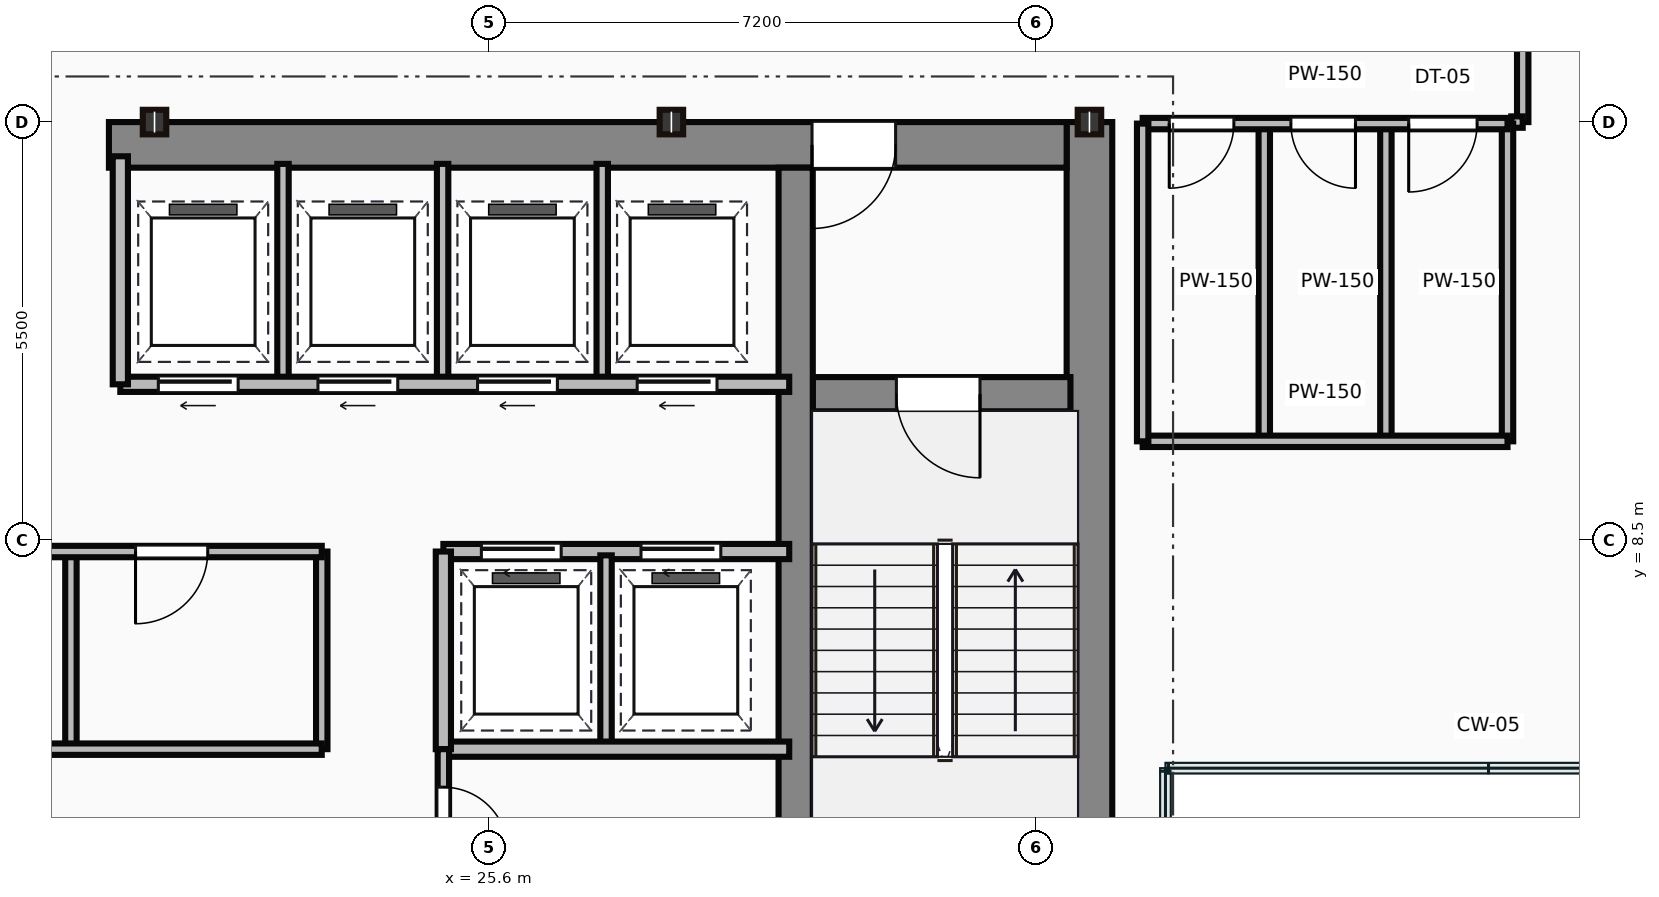
"""IFC4 building model, lengths in metres.
Left out: names, types, materials, properties, quantities, classifications, styles, units other than length and angle.
Written with IfcOpenShell. Run it as: python <this file> out.ifc"""

import sys

from ifc_helpers import new_model, si_unit, direction, frame, frame_2d, origin, origin_2d, place, context, subcontext, project, spatial, rectangle, i_section, extrude, source, transform, mapped, element, fill, save


model = new_model("IFC4")
c1 = context("Model", 3, precision=1e-05, world=origin(), true_north=direction((0.0, 1.0)))
c2 = subcontext(c1, "Body", "Model", "MODEL_VIEW")
j1 = project(units=[si_unit("LENGTHUNIT", "METRE"), si_unit("PLANEANGLEUNIT", "RADIAN")], contexts=[c1])
p1 = place(None, origin())
s1 = spatial("IfcSite", under=j1, at=p1, CompositionType="ELEMENT")
p2 = place(p1, origin())
s2 = spatial("IfcBuilding", under=s1, at=p2, CompositionType="ELEMENT")
p3 = place(p2, frame((0.0, 0.0, 258.8)))
s3 = spatial("IfcBuildingStorey", under=s2, at=p3, CompositionType="ELEMENT", Elevation=258.8)
m1 = source(origin(), c2, "Body", "SweptSolid", [
    extrude(rectangle(XDim=13.1, YDim=0.6, at=frame_2d((6.55, 0.0))), origin(), (0.0, 0.0, 1.0), 3.65),
])
p4 = place(p3, frame((33.5, 0.9, 0.0), z_axis=(0.0, 0.0, 1.0), x_axis=(0.0, 1.0, 0.0)))
e1 = element("IfcWall", 1, at=p4, inside=s3, PredefinedType="SHEAR", context=c2, shape_type="MappedRepresentation", body=[
    mapped(m1, transform((0.0, 0.0, 0.0))),
])
m2 = source(origin(), c2, "Body", "SweptSolid", [
    extrude(rectangle(XDim=12.6, YDim=0.6, at=frame_2d((6.3, 0.0))), origin(), (0.0, 0.0, 1.0), 3.65),
])
p5 = place(p3, frame((20.6, 13.7, 0.0), z_axis=(0.0, 0.0, 1.0), x_axis=(1.0, 0.0, 0.0)))
e2 = element("IfcWall", 2, at=p5, inside=s3, PredefinedType="SHEAR", context=c2, shape_type="MappedRepresentation", body=[
    mapped(m2, transform((0.0, 0.0, 0.0))),
])
p6 = place(p5, frame((9.25, 0.0, 0.0)))
e3 = element("IfcOpeningElement", 3, at=p6, cuts=e2, PredefinedType="OPENING", context=c2, shape_type="SweptSolid", body=[
    extrude(rectangle(XDim=1.1, YDim=2.15, at=frame_2d((0.55, 1.075))), frame((0.0, 0.31, 0.0), z_axis=(0.0, -1.0, 0.0), x_axis=(1.0, 0.0, 0.0)), (0.0, 0.0, 1.0), 0.62),
])
m3 = source(origin(), c2, "Body", "SweptSolid", [
    extrude(rectangle(XDim=12.5, YDim=0.45, at=frame_2d((6.25, 0.0))), origin(), (0.0, 0.0, 1.0), 3.65),
])
p7 = place(p3, frame((29.635, 0.9, 0.0), z_axis=(0.0, 0.0, 1.0), x_axis=(0.0, 1.0, 0.0)))
e4 = element("IfcWall", 4, at=p7, inside=s3, PredefinedType="SHEAR", context=c2, shape_type="MappedRepresentation", body=[
    mapped(m3, transform((0.0, 0.0, 0.0))),
])
m4 = source(origin(), c2, "Body", "SweptSolid", [
    extrude(rectangle(XDim=3.39, YDim=0.45, at=frame_2d((1.695, 0.0))), origin(), (0.0, 0.0, 1.0), 3.65),
])
p8 = place(p3, frame((29.86, 10.42, 0.0), z_axis=(0.0, 0.0, 1.0), x_axis=(1.0, 0.0, 0.0)))
e5 = element("IfcWall", 5, at=p8, inside=s3, PredefinedType="SHEAR", context=c2, shape_type="MappedRepresentation", body=[
    mapped(m4, transform((0.0, 0.0, 0.0))),
])
p9 = place(p8, frame((1.1, 0.0, 0.0)))
e6 = element("IfcOpeningElement", 6, at=p9, cuts=e5, PredefinedType="OPENING", context=c2, shape_type="SweptSolid", body=[
    extrude(rectangle(XDim=1.1, YDim=2.15, at=frame_2d((0.55, 1.075))), frame((0.0, 0.235, 0.0), z_axis=(0.0, -1.0, 0.0), x_axis=(1.0, 0.0, 0.0)), (0.0, 0.0, 1.0), 0.47),
])
m5 = source(origin(), c2, "Body", "SweptSolid", [
    extrude(i_section(OverallWidth=0.309, OverallDepth=0.323, WebThickness=0.014, FlangeThickness=0.023, at=origin_2d()), origin(), (0.0, 0.0, 1.0), 3.65),
])
for number, where, z_axis, x_axis in (
    (7, (21.2, 14.0, 0.0), (0.0, 0.0, 1.0), (1.0, 0.0, 0.0)),
    (8, (28.0, 14.0, 0.0), (0.0, 0.0, 1.0), (1.0, 0.0, 0.0)),
    (9, (33.5, 14.0, 0.0), (0.0, 0.0, 1.0), (1.0, 0.0, 0.0)),
):
    element("IfcColumn", number, at=place(p3, frame(where, z_axis=z_axis, x_axis=x_axis)), inside=s3, PredefinedType="COLUMN", context=c2, shape_type="MappedRepresentation", body=[
        mapped(m5, transform((0.0, 0.0, 0.0))),
    ])
m6 = source(origin(), c2, "Body", "SweptSolid", [
    extrude(rectangle(XDim=11.85, YDim=0.15, at=frame_2d((5.925, 0.0))), origin(), (0.0, 0.0, 1.0), 3.4),
])
p10 = place(p3, frame((11.55, 5.75, 0.0), z_axis=(0.0, 0.0, 1.0), x_axis=(1.0, 0.0, 0.0)))
e10 = element("IfcWall", 10, at=p10, inside=s3, PredefinedType="PARTITIONING", context=c2, shape_type="MappedRepresentation", body=[
    mapped(m6, transform((0.0, 0.0, 0.0))),
])
p11 = place(p3, frame((11.55, 8.35, 0.0), z_axis=(0.0, 0.0, 1.0), x_axis=(1.0, 0.0, 0.0)))
e11 = element("IfcWall", 11, at=p11, inside=s3, PredefinedType="PARTITIONING", context=c2, shape_type="MappedRepresentation", body=[
    mapped(m6, transform((0.0, 0.0, 0.0))),
])
p12 = place(p11, frame((1.1, 0.0, 0.0)))
e12 = element("IfcOpeningElement", 12, at=p12, cuts=e11, PredefinedType="OPENING", context=c2, shape_type="SweptSolid", body=[
    extrude(rectangle(XDim=0.95, YDim=2.15, at=frame_2d((0.475, 1.075))), frame((0.0, 0.085, 0.0), z_axis=(0.0, -1.0, 0.0), x_axis=(1.0, 0.0, 0.0)), (0.0, 0.0, 1.0), 0.17),
])
p13 = place(p11, frame((9.4, 0.0, 0.0)))
e13 = element("IfcOpeningElement", 13, at=p13, cuts=e11, PredefinedType="OPENING", context=c2, shape_type="SweptSolid", body=[
    extrude(rectangle(XDim=0.95, YDim=2.15, at=frame_2d((0.475, 1.075))), frame((0.0, 0.085, 0.0), z_axis=(0.0, -1.0, 0.0), x_axis=(1.0, 0.0, 0.0)), (0.0, 0.0, 1.0), 0.17),
])
m7 = source(origin(), c2, "Body", "SweptSolid", [
    extrude(rectangle(XDim=2.6, YDim=0.15, at=frame_2d((1.3, 0.0))), origin(), (0.0, 0.0, 1.0), 3.4),
])
p14 = place(p3, frame((23.4, 5.75, 0.0), z_axis=(0.0, 0.0, 1.0), x_axis=(0.0, 1.0, 0.0)))
e14 = element("IfcWall", 14, at=p14, inside=s3, PredefinedType="PARTITIONING", context=c2, shape_type="MappedRepresentation", body=[
    mapped(m7, transform((0.0, 0.0, 0.0))),
])
m8 = source(origin(), c2, "Body", "SweptSolid", [
    extrude(rectangle(XDim=2.5, YDim=0.15, at=frame_2d((1.25, 0.0))), origin(), (0.0, 0.0, 1.0), 3.4),
])
p15 = place(p3, frame((20.1, 5.8, 0.0), z_axis=(0.0, 0.0, 1.0), x_axis=(0.0, 1.0, 0.0)))
e15 = element("IfcWall", 15, at=p15, inside=s3, PredefinedType="PARTITIONING", context=c2, shape_type="MappedRepresentation", body=[
    mapped(m8, transform((0.0, 0.0, 0.0))),
])
m9 = source(origin(), c2, "Body", "SweptSolid", [
    extrude(rectangle(XDim=8.8, YDim=0.2, at=frame_2d((4.4, 0.0))), origin(), (0.0, 0.0, 1.0), 3.4),
])
p16 = place(p3, frame((20.75, 10.55, 0.0), z_axis=(0.0, 0.0, 1.0), x_axis=(1.0, 0.0, 0.0)))
e16 = element("IfcWall", 16, at=p16, inside=s3, PredefinedType="PARTITIONING", context=c2, shape_type="MappedRepresentation", body=[
    mapped(m9, transform((0.0, 0.0, 0.0))),
])
p17 = place(p16, frame((0.5, 0.0, 0.0)))
e17 = element("IfcOpeningElement", 17, at=p17, cuts=e16, PredefinedType="OPENING", context=c2, shape_type="SweptSolid", body=[
    extrude(rectangle(XDim=1.05, YDim=2.15, at=frame_2d((0.525, 1.075))), frame((0.0, 0.11, 0.0), z_axis=(0.0, -1.0, 0.0), x_axis=(1.0, 0.0, 0.0)), (0.0, 0.0, 1.0), 0.22),
])
p18 = place(p16, frame((2.6, 0.0, 0.0)))
e18 = element("IfcOpeningElement", 18, at=p18, cuts=e16, PredefinedType="OPENING", context=c2, shape_type="SweptSolid", body=[
    extrude(rectangle(XDim=1.05, YDim=2.15, at=frame_2d((0.525, 1.075))), frame((0.0, 0.11, 0.0), z_axis=(0.0, -1.0, 0.0), x_axis=(1.0, 0.0, 0.0)), (0.0, 0.0, 1.0), 0.22),
])
p19 = place(p16, frame((4.7, 0.0, 0.0)))
e19 = element("IfcOpeningElement", 19, at=p19, cuts=e16, PredefinedType="OPENING", context=c2, shape_type="SweptSolid", body=[
    extrude(rectangle(XDim=1.05, YDim=2.15, at=frame_2d((0.525, 1.075))), frame((0.0, 0.11, 0.0), z_axis=(0.0, -1.0, 0.0), x_axis=(1.0, 0.0, 0.0)), (0.0, 0.0, 1.0), 0.22),
])
p20 = place(p16, frame((6.8, 0.0, 0.0)))
e20 = element("IfcOpeningElement", 20, at=p20, cuts=e16, PredefinedType="OPENING", context=c2, shape_type="SweptSolid", body=[
    extrude(rectangle(XDim=1.05, YDim=2.15, at=frame_2d((0.525, 1.075))), frame((0.0, 0.11, 0.0), z_axis=(0.0, -1.0, 0.0), x_axis=(1.0, 0.0, 0.0)), (0.0, 0.0, 1.0), 0.22),
])
m10 = source(origin(), c2, "Body", "SweptSolid", [
    extrude(rectangle(XDim=3.0, YDim=0.2, at=frame_2d((1.5, 0.0))), origin(), (0.0, 0.0, 1.0), 3.4),
])
p21 = place(p3, frame((20.75, 10.55, 0.0), z_axis=(0.0, 0.0, 1.0), x_axis=(0.0, 1.0, 0.0)))
e21 = element("IfcWall", 21, at=p21, inside=s3, PredefinedType="PARTITIONING", context=c2, shape_type="MappedRepresentation", body=[
    mapped(m10, transform((0.0, 0.0, 0.0))),
])
m11 = source(origin(), c2, "Body", "SweptSolid", [
    extrude(rectangle(XDim=2.85, YDim=0.15, at=frame_2d((1.425, 0.0))), origin(), (0.0, 0.0, 1.0), 3.4),
])
for number, where, z_axis, x_axis in (
    (22, (22.89, 10.6, 0.0), (0.0, 0.0, 1.0), (0.0, 1.0, 0.0)),
    (23, (24.99, 10.6, 0.0), (0.0, 0.0, 1.0), (0.0, 1.0, 0.0)),
    (24, (27.09, 10.6, 0.0), (0.0, 0.0, 1.0), (0.0, 1.0, 0.0)),
):
    element("IfcWall", number, at=place(p3, frame(where, z_axis=z_axis, x_axis=x_axis)), inside=s3, PredefinedType="PARTITIONING", context=c2, shape_type="MappedRepresentation", body=[
        mapped(m11, transform((0.0, 0.0, 0.0))),
    ])
m12 = source(origin(), c2, "Body", "SweptSolid", [
    extrude(rectangle(XDim=4.55, YDim=0.2, at=frame_2d((2.275, 0.0))), origin(), (0.0, 0.0, 1.0), 3.4),
])
p22 = place(p3, frame((25.0, 8.35, 0.0), z_axis=(0.0, 0.0, 1.0), x_axis=(1.0, 0.0, 0.0)))
e25 = element("IfcWall", 25, at=p22, inside=s3, PredefinedType="PARTITIONING", context=c2, shape_type="MappedRepresentation", body=[
    mapped(m12, transform((0.0, 0.0, 0.0))),
])
p23 = place(p22, frame((0.5, 0.0, 0.0)))
e26 = element("IfcOpeningElement", 26, at=p23, cuts=e25, PredefinedType="OPENING", context=c2, shape_type="SweptSolid", body=[
    extrude(rectangle(XDim=1.05, YDim=2.15, at=frame_2d((0.525, 1.075))), frame((0.0, 0.11, 0.0), z_axis=(0.0, -1.0, 0.0), x_axis=(1.0, 0.0, 0.0)), (0.0, 0.0, 1.0), 0.22),
])
p24 = place(p22, frame((2.6, 0.0, 0.0)))
e27 = element("IfcOpeningElement", 27, at=p24, cuts=e25, PredefinedType="OPENING", context=c2, shape_type="SweptSolid", body=[
    extrude(rectangle(XDim=1.05, YDim=2.15, at=frame_2d((0.525, 1.075))), frame((0.0, 0.11, 0.0), z_axis=(0.0, -1.0, 0.0), x_axis=(1.0, 0.0, 0.0)), (0.0, 0.0, 1.0), 0.22),
])
p25 = place(p3, frame((25.0, 5.75, 0.0), z_axis=(0.0, 0.0, 1.0), x_axis=(1.0, 0.0, 0.0)))
e28 = element("IfcWall", 28, at=p25, inside=s3, PredefinedType="PARTITIONING", context=c2, shape_type="MappedRepresentation", body=[
    mapped(m12, transform((0.0, 0.0, 0.0))),
])
m13 = source(origin(), c2, "Body", "SweptSolid", [
    extrude(rectangle(XDim=2.6, YDim=0.2, at=frame_2d((1.3, 0.0))), origin(), (0.0, 0.0, 1.0), 3.4),
])
p26 = place(p3, frame((25.0, 5.75, 0.0), z_axis=(0.0, 0.0, 1.0), x_axis=(0.0, 1.0, 0.0)))
e29 = element("IfcWall", 29, at=p26, inside=s3, PredefinedType="PARTITIONING", context=c2, shape_type="MappedRepresentation", body=[
    mapped(m13, transform((0.0, 0.0, 0.0))),
])
p27 = place(p3, frame((27.14, 5.8, 0.0), z_axis=(0.0, 0.0, 1.0), x_axis=(0.0, 1.0, 0.0)))
e30 = element("IfcWall", 30, at=p27, inside=s3, PredefinedType="PARTITIONING", context=c2, shape_type="MappedRepresentation", body=[
    mapped(m8, transform((0.0, 0.0, 0.0))),
])
m14 = source(origin(), c2, "Body", "SweptSolid", [
    extrude(rectangle(XDim=4.9, YDim=0.15, at=frame_2d((2.45, 0.0))), origin(), (0.0, 0.0, 1.0), 3.4),
])
p28 = place(p3, frame((25.0, 0.85, 0.0), z_axis=(0.0, 0.0, 1.0), x_axis=(0.0, 1.0, 0.0)))
e31 = element("IfcWall", 31, at=p28, inside=s3, PredefinedType="PARTITIONING", context=c2, shape_type="MappedRepresentation", body=[
    mapped(m14, transform((0.0, 0.0, 0.0))),
])
p29 = place(p28, frame((1.85, 0.0, 0.0)))
e32 = element("IfcOpeningElement", 32, at=p29, cuts=e31, PredefinedType="OPENING", context=c2, shape_type="SweptSolid", body=[
    extrude(rectangle(XDim=0.95, YDim=2.15, at=frame_2d((0.475, 1.075))), frame((0.0, 0.085, 0.0), z_axis=(0.0, -1.0, 0.0), x_axis=(1.0, 0.0, 0.0)), (0.0, 0.0, 1.0), 0.17),
])
p30 = place(p28, frame((3.55, 0.0, 0.0)))
e33 = element("IfcOpeningElement", 33, at=p30, cuts=e31, PredefinedType="OPENING", context=c2, shape_type="SweptSolid", body=[
    extrude(rectangle(XDim=0.85, YDim=2.15, at=frame_2d((0.425, 1.075))), frame((0.0, 0.085, 0.0), z_axis=(0.0, -1.0, 0.0), x_axis=(1.0, 0.0, 0.0)), (0.0, 0.0, 1.0), 0.17),
])
m15 = source(origin(), c2, "Body", "SweptSolid", [
    extrude(rectangle(XDim=4.8, YDim=0.15, at=frame_2d((2.4, 0.0))), origin(), (0.0, 0.0, 1.0), 2.787),
])
p31 = place(p3, frame((34.2, 13.98, 0.0), z_axis=(0.0, 0.0, 1.0), x_axis=(1.0, 0.0, 0.0)))
e34 = element("IfcWall", 34, at=p31, inside=s3, PredefinedType="PARTITIONING", context=c2, shape_type="MappedRepresentation", body=[
    mapped(m15, transform((0.0, 0.0, 0.0))),
])
p32 = place(p31, frame((0.35, 0.0, 0.0)))
e35 = element("IfcOpeningElement", 35, at=p32, cuts=e34, PredefinedType="OPENING", context=c2, shape_type="SweptSolid", body=[
    extrude(rectangle(XDim=0.85, YDim=2.1, at=frame_2d((0.425, 1.05))), frame((0.0, 0.085, 0.0), z_axis=(0.0, -1.0, 0.0), x_axis=(1.0, 0.0, 0.0)), (0.0, 0.0, 1.0), 0.17),
])
p33 = place(p31, frame((1.95, 0.0, 0.0)))
e36 = element("IfcOpeningElement", 36, at=p33, cuts=e34, PredefinedType="OPENING", context=c2, shape_type="SweptSolid", body=[
    extrude(rectangle(XDim=0.85, YDim=2.1, at=frame_2d((0.425, 1.05))), frame((0.0, 0.085, 0.0), z_axis=(0.0, -1.0, 0.0), x_axis=(1.0, 0.0, 0.0)), (0.0, 0.0, 1.0), 0.17),
])
p34 = place(p31, frame((3.5, 0.0, 0.0)))
e37 = element("IfcOpeningElement", 37, at=p34, cuts=e34, PredefinedType="OPENING", context=c2, shape_type="SweptSolid", body=[
    extrude(rectangle(XDim=0.9, YDim=2.1, at=frame_2d((0.45, 1.05))), frame((0.0, 0.085, 0.0), z_axis=(0.0, -1.0, 0.0), x_axis=(1.0, 0.0, 0.0)), (0.0, 0.0, 1.0), 0.17),
])
m16 = source(origin(), c2, "Body", "SweptSolid", [
    extrude(rectangle(XDim=4.8, YDim=0.15, at=frame_2d((2.4, 0.0))), origin(), (0.0, 0.0, 1.0), 3.4),
])
p35 = place(p3, frame((34.2, 9.8, 0.0), z_axis=(0.0, 0.0, 1.0), x_axis=(1.0, 0.0, 0.0)))
e38 = element("IfcWall", 38, at=p35, inside=s3, PredefinedType="PARTITIONING", context=c2, shape_type="MappedRepresentation", body=[
    mapped(m16, transform((0.0, 0.0, 0.0))),
])
m17 = source(origin(), c2, "Body", "SweptSolid", [
    extrude(rectangle(XDim=4.18, YDim=0.15, at=frame_2d((2.09, 0.0))), origin(), (0.0, 0.0, 1.0), 3.4),
])
for number, where, z_axis, x_axis in (
    (39, (39.0, 9.8, 0.0), (0.0, 0.0, 1.0), (0.0, 1.0, 0.0)),
    (40, (34.2, 9.8, 0.0), (0.0, 0.0, 1.0), (0.0, 1.0, 0.0)),
    (41, (35.8, 9.8, 0.0), (0.0, 0.0, 1.0), (0.0, 1.0, 0.0)),
    (42, (37.4, 9.8, 0.0), (0.0, 0.0, 1.0), (0.0, 1.0, 0.0)),
):
    element("IfcWall", number, at=place(p3, frame(where, z_axis=z_axis, x_axis=x_axis)), inside=s3, PredefinedType="PARTITIONING", context=c2, shape_type="MappedRepresentation", body=[
        mapped(m17, transform((0.0, 0.0, 0.0))),
    ])
m18 = source(origin(), c2, "Body", "SweptSolid", [
    extrude(rectangle(XDim=2.2, YDim=0.15, at=frame_2d((1.1, 0.0))), origin(), (0.0, 0.0, 1.0), 3.4),
])
p36 = place(p3, frame((39.2, 16.2, 0.0), z_axis=(0.0, 0.0, 1.0), x_axis=(0.0, -1.0, 0.0)))
e43 = element("IfcWall", 43, at=p36, inside=s3, PredefinedType="PARTITIONING", context=c2, shape_type="MappedRepresentation", body=[
    mapped(m18, transform((0.0, 0.0, 0.0))),
])
m19 = source(origin(), c2, "Body", "SweptSolid", [
    extrude(rectangle(XDim=0.15, YDim=0.15, at=frame_2d((0.075, 0.0))), origin(), (0.0, 0.0, 1.0), 3.4),
])
p37 = place(p3, frame((39.2, 14.0, 0.0), z_axis=(0.0, 0.0, 1.0), x_axis=(-1.0, 0.0, 0.0)))
e44 = element("IfcWall", 44, at=p37, inside=s3, PredefinedType="PARTITIONING", context=c2, shape_type="MappedRepresentation", body=[
    mapped(m19, transform((0.0, 0.0, 0.0))),
])
m20 = source(origin(), c2, "Body", "SweptSolid", [
    extrude(rectangle(XDim=1.1, YDim=2.15, at=frame_2d((0.55, 1.075))), frame((0.0, 0.025, 0.0), z_axis=(0.0, -1.0, 0.0), x_axis=(1.0, 0.0, 0.0)), (0.0, 0.0, 1.0), 0.05),
])
p38 = place(p9, frame((1.1, 0.0, 0.0), z_axis=(0.0, 0.0, 1.0), x_axis=(-1.0, 0.0, 0.0)))
e45 = element("IfcDoor", 45, at=p38, inside=s3, OperationType="SINGLE_SWING_RIGHT", PredefinedType="DOOR", context=c2, shape_type="MappedRepresentation", body=[
    mapped(m20, transform((0.0, 0.0, 0.0))),
])
fill(e6, e45)
p39 = place(p6, origin())
e46 = element("IfcDoor", 46, at=p39, inside=s3, OperationType="SINGLE_SWING_LEFT", PredefinedType="DOOR", context=c2, shape_type="MappedRepresentation", body=[
    mapped(m20, transform((0.0, 0.0, 0.0))),
])
fill(e3, e46)
m21 = source(origin(), c2, "Body", "SweptSolid", [
    extrude(rectangle(XDim=0.95, YDim=2.15, at=frame_2d((0.475, 1.075))), frame((0.0, 0.025, 0.0), z_axis=(0.0, -1.0, 0.0), x_axis=(1.0, 0.0, 0.0)), (0.0, 0.0, 1.0), 0.05),
])
p40 = place(p13, origin())
e47 = element("IfcDoor", 47, at=p40, inside=s3, OperationType="SINGLE_SWING_LEFT", PredefinedType="DOOR", context=c2, shape_type="MappedRepresentation", body=[
    mapped(m21, transform((0.0, 0.0, 0.0))),
])
fill(e13, e47)
m22 = source(origin(), c2, "Body", "SweptSolid", [
    extrude(rectangle(XDim=1.05, YDim=2.15, at=frame_2d((0.525, 1.075))), frame((0.0, 0.025, 0.0), z_axis=(0.0, -1.0, 0.0), x_axis=(1.0, 0.0, 0.0)), (0.0, 0.0, 1.0), 0.05),
])
p41 = place(p17, frame((1.05, 0.0, 0.0), z_axis=(0.0, 0.0, 1.0), x_axis=(-1.0, 0.0, 0.0)))
e48 = element("IfcDoor", 48, at=p41, inside=s3, OperationType="SLIDING_TO_LEFT", PredefinedType="DOOR", context=c2, shape_type="MappedRepresentation", body=[
    mapped(m22, transform((0.0, 0.0, 0.0))),
])
fill(e17, e48)
p42 = place(p18, frame((1.05, 0.0, 0.0), z_axis=(0.0, 0.0, 1.0), x_axis=(-1.0, 0.0, 0.0)))
e49 = element("IfcDoor", 49, at=p42, inside=s3, OperationType="SLIDING_TO_LEFT", PredefinedType="DOOR", context=c2, shape_type="MappedRepresentation", body=[
    mapped(m22, transform((0.0, 0.0, 0.0))),
])
fill(e18, e49)
p43 = place(p19, frame((1.05, 0.0, 0.0), z_axis=(0.0, 0.0, 1.0), x_axis=(-1.0, 0.0, 0.0)))
e50 = element("IfcDoor", 50, at=p43, inside=s3, OperationType="SLIDING_TO_LEFT", PredefinedType="DOOR", context=c2, shape_type="MappedRepresentation", body=[
    mapped(m22, transform((0.0, 0.0, 0.0))),
])
fill(e19, e50)
p44 = place(p20, frame((1.05, 0.0, 0.0), z_axis=(0.0, 0.0, 1.0), x_axis=(-1.0, 0.0, 0.0)))
e51 = element("IfcDoor", 51, at=p44, inside=s3, OperationType="SLIDING_TO_LEFT", PredefinedType="DOOR", context=c2, shape_type="MappedRepresentation", body=[
    mapped(m22, transform((0.0, 0.0, 0.0))),
])
fill(e20, e51)
p45 = place(p23, origin())
e52 = element("IfcDoor", 52, at=p45, inside=s3, OperationType="SLIDING_TO_LEFT", PredefinedType="DOOR", context=c2, shape_type="MappedRepresentation", body=[
    mapped(m22, transform((0.0, 0.0, 0.0))),
])
fill(e26, e52)
p46 = place(p24, origin())
e53 = element("IfcDoor", 53, at=p46, inside=s3, OperationType="SLIDING_TO_LEFT", PredefinedType="DOOR", context=c2, shape_type="MappedRepresentation", body=[
    mapped(m22, transform((0.0, 0.0, 0.0))),
])
fill(e27, e53)
m23 = source(origin(), c2, "Body", "SweptSolid", [
    extrude(rectangle(XDim=0.85, YDim=2.15, at=frame_2d((0.425, 1.075))), frame((0.0, 0.025, 0.0), z_axis=(0.0, -1.0, 0.0), x_axis=(1.0, 0.0, 0.0)), (0.0, 0.0, 1.0), 0.05),
])
p47 = place(p30, origin())
e54 = element("IfcDoor", 54, at=p47, inside=s3, OperationType="SINGLE_SWING_LEFT", PredefinedType="DOOR", context=c2, shape_type="MappedRepresentation", body=[
    mapped(m23, transform((0.0, 0.0, 0.0))),
])
fill(e33, e54)
m24 = source(origin(), c2, "Body", "SweptSolid", [
    extrude(rectangle(XDim=0.85, YDim=2.1, at=frame_2d((0.425, 1.05))), frame((0.0, 0.025, 0.0), z_axis=(0.0, -1.0, 0.0), x_axis=(1.0, 0.0, 0.0)), (0.0, 0.0, 1.0), 0.05),
])
p48 = place(p32, frame((0.85, 0.0, 0.0), z_axis=(0.0, 0.0, 1.0), x_axis=(-1.0, 0.0, 0.0)))
e55 = element("IfcDoor", 55, at=p48, inside=s3, OperationType="SINGLE_SWING_LEFT", PredefinedType="DOOR", context=c2, shape_type="MappedRepresentation", body=[
    mapped(m24, transform((0.0, 0.0, 0.0))),
])
fill(e35, e55)
p49 = place(p33, frame((0.85, 0.0, 0.0), z_axis=(0.0, 0.0, 1.0), x_axis=(-1.0, 0.0, 0.0)))
e56 = element("IfcDoor", 56, at=p49, inside=s3, OperationType="SINGLE_SWING_RIGHT", PredefinedType="DOOR", context=c2, shape_type="MappedRepresentation", body=[
    mapped(m24, transform((0.0, 0.0, 0.0))),
])
fill(e36, e56)
m25 = source(origin(), c2, "Body", "SweptSolid", [
    extrude(rectangle(XDim=0.9, YDim=2.1, at=frame_2d((0.45, 1.05))), frame((0.0, 0.025, 0.0), z_axis=(0.0, -1.0, 0.0), x_axis=(1.0, 0.0, 0.0)), (0.0, 0.0, 1.0), 0.05),
])
p50 = place(p34, frame((0.9, 0.0, 0.0), z_axis=(0.0, 0.0, 1.0), x_axis=(-1.0, 0.0, 0.0)))
e57 = element("IfcDoor", 57, at=p50, inside=s3, OperationType="SINGLE_SWING_LEFT", PredefinedType="DOOR", context=c2, shape_type="MappedRepresentation", body=[
    mapped(m25, transform((0.0, 0.0, 0.0))),
])
fill(e37, e57)
save(model, sys.argv[1])
